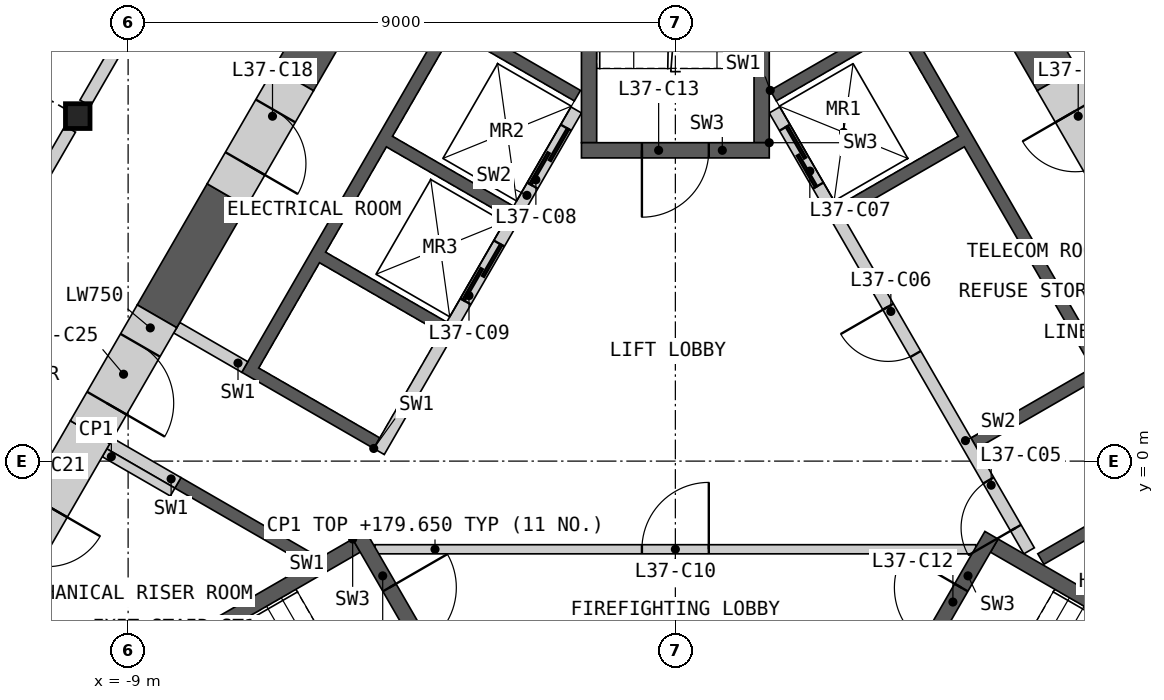
"""IFC4 building model, lengths in metres.
Left out: names, types, materials, properties, quantities, classifications, styles, units other than length and angle.
Written with IfcOpenShell. Run it as: python <this file> out.ifc"""

import sys

from ifc_helpers import new_model, si_unit, direction, frame, frame_2d, origin, origin_2d, place, context, subcontext, project, spatial, polyline, rectangle, i_section, outline, extrude, element, fill, save


model = new_model("IFC4")
c1 = context("Model", 3, precision=1e-05, world=origin(), true_north=direction((0.0, 1.0)))
c2 = subcontext(c1, "Body", "Model", "MODEL_VIEW")
j1 = project(units=[si_unit("LENGTHUNIT", "METRE"), si_unit("PLANEANGLEUNIT", "RADIAN")], contexts=[c1])
p1 = place(None, origin())
s1 = spatial("IfcSite", under=j1, at=p1, CompositionType="ELEMENT")
p2 = place(p1, origin())
s2 = spatial("IfcBuilding", under=s1, at=p2, CompositionType="ELEMENT")
p3 = place(p2, frame((0.0, 0.0, 176.4)))
s3 = spatial("IfcBuildingStorey", under=s2, at=p3, CompositionType="ELEMENT", Elevation=176.4)
p4 = place(p3, frame((-9.828, 5.675, 0.0), z_axis=(0.0, 0.0, 1.0), x_axis=(1.0, 0.0, 0.0)))
e1 = element("IfcColumn", 1, at=p4, inside=s3, PredefinedType="COLUMN", context=c2, shape_type="SweptSolid", body=[
    extrude(i_section(OverallWidth=0.404, OverallDepth=0.407, WebThickness=0.027, FlangeThickness=0.044, at=origin_2d()), origin(), (0.0, 0.0, 1.0), 3.6),
])
p5 = place(p3, origin())
e2 = element("IfcWall", 2, at=p5, inside=s3, PredefinedType="SHEAR", context=c2, shape_type="SweptSolid", body=[
    extrude(outline(polyline([(1.561, 6.097), (3.731, 7.35), (7.131, 1.461), (4.96, 0.208), (4.861, 0.381), (6.852, 1.531), (4.752, 5.169), (2.76, 4.019), (2.66, 4.192), (4.652, 5.342), (3.652, 7.074), (1.66, 5.924), (1.561, 6.097)])), origin(), (0.0, 0.0, 1.0), 3.25),
])
p6 = place(p3, origin())
e3 = element("IfcWall", 3, at=p6, inside=s3, PredefinedType="SHEAR", context=c2, shape_type="SweptSolid", body=[
    extrude(outline(polyline([(8.231, -0.444), (6.061, -1.697), (5.96, -1.524), (8.131, -0.271), (8.231, -0.444)])), origin(), (0.0, 0.0, 1.0), 3.25),
])
p7 = place(p3, frame((5.817, -1.476, 0.0), z_axis=(0.0, 0.0, 1.0), x_axis=(-0.500002616675, 0.866023893041, 0.0)))
e4 = element("IfcWall", 4, at=p7, inside=s3, PredefinedType="SOLIDWALL", context=c2, shape_type="SweptSolid", body=[
    extrude(rectangle(XDim=8.373, YDim=0.2, at=frame_2d((4.187, 0.0))), origin(), (0.0, 0.0, 1.0), 3.25),
])
p8 = place(p7, frame((0.437, 0.0, 0.0)))
e5 = element("IfcOpeningElement", 5, at=p8, cuts=e4, PredefinedType="OPENING", context=c2, shape_type="SweptSolid", body=[
    extrude(rectangle(XDim=0.9, YDim=2.1, at=frame_2d((0.45, 1.05))), frame((0.0, 0.11, 0.0), z_axis=(0.0, -1.0, 0.0), x_axis=(1.0, 0.0, 0.0)), (0.0, 0.0, 1.0), 0.22),
])
p9 = place(p7, frame((3.737, 0.0, 0.0)))
e6 = element("IfcOpeningElement", 6, at=p9, cuts=e4, PredefinedType="OPENING", context=c2, shape_type="SweptSolid", body=[
    extrude(rectangle(XDim=0.9, YDim=2.1, at=frame_2d((0.45, 1.05))), frame((0.0, 0.11, 0.0), z_axis=(0.0, -1.0, 0.0), x_axis=(1.0, 0.0, 0.0)), (0.0, 0.0, 1.0), 0.22),
])
p10 = place(p7, frame((6.937, 0.0, 0.0)))
e7 = element("IfcOpeningElement", 7, at=p10, cuts=e4, PredefinedType="OPENING", context=c2, shape_type="SweptSolid", body=[
    extrude(rectangle(XDim=1.1, YDim=2.1, at=frame_2d((0.55, 1.05))), frame((0.0, 0.11, 0.0), z_axis=(0.0, -1.0, 0.0), x_axis=(1.0, 0.0, 0.0)), (0.0, 0.0, 1.0), 0.22),
])
p11 = place(p3, origin())
e8 = element("IfcWall", 8, at=p11, inside=s3, PredefinedType="SHEAR", context=c2, shape_type="SweptSolid", body=[
    extrude(outline(polyline([(-6.061, -1.697), (-8.231, -0.444), (-8.131, -0.271), (-5.96, -1.524), (-6.061, -1.697)])), origin(), (0.0, 0.0, 1.0), 3.25),
])
p12 = place(p3, origin())
e9 = element("IfcWall", 9, at=p12, inside=s3, PredefinedType="SHEAR", context=c2, shape_type="SweptSolid", body=[
    extrude(outline(polyline([(-4.96, 0.208), (-7.131, 1.461), (-3.731, 7.35), (-1.561, 6.097), (-1.66, 5.924), (-3.652, 7.074), (-4.652, 5.342), (-2.66, 4.192), (-2.76, 4.019), (-4.752, 5.169), (-5.752, 3.437), (-3.76, 2.287), (-3.861, 2.113), (-5.852, 3.263), (-6.852, 1.531), (-4.861, 0.381), (-4.96, 0.208)])), origin(), (0.0, 0.0, 1.0), 3.25),
])
p13 = place(p3, frame((-1.631, 5.776, 0.0), z_axis=(0.0, 0.0, 1.0), x_axis=(-0.499992876559, -0.866029516466, 0.0)))
e10 = element("IfcWall", 10, at=p13, inside=s3, PredefinedType="SOLIDWALL", context=c2, shape_type="SweptSolid", body=[
    extrude(rectangle(XDim=6.486, YDim=0.2, at=frame_2d((3.243, 0.0))), origin(), (0.0, 0.0, 1.0), 3.25),
])
p14 = place(p13, frame((0.337, 0.0, 0.0)))
e11 = element("IfcOpeningElement", 11, at=p14, cuts=e10, PredefinedType="OPENING", context=c2, shape_type="SweptSolid", body=[
    extrude(rectangle(XDim=1.1, YDim=2.1, at=frame_2d((0.55, 1.05))), frame((0.0, 0.11, 0.0), z_axis=(0.0, -1.0, 0.0), x_axis=(1.0, 0.0, 0.0)), (0.0, 0.0, 1.0), 0.22),
])
p15 = place(p13, frame((2.537, 0.0, 0.0)))
e12 = element("IfcOpeningElement", 12, at=p15, cuts=e10, PredefinedType="OPENING", context=c2, shape_type="SweptSolid", body=[
    extrude(rectangle(XDim=1.1, YDim=2.1, at=frame_2d((0.55, 1.05))), frame((0.0, 0.11, 0.0), z_axis=(0.0, -1.0, 0.0), x_axis=(1.0, 0.0, 0.0)), (0.0, 0.0, 1.0), 0.22),
])
for number, where, z_axis, x_axis in (
    (13, (-7.081, 1.548, 0.0), (0.0, 0.0, 1.0), (-0.866, 0.5, 0.0)),
    (14, (-8.181, -0.357, 0.0), (0.0, 0.0, 1.0), (-0.866, 0.5, 0.0)),
):
    element("IfcWall", number, at=place(p3, frame(where, z_axis=z_axis, x_axis=x_axis)), inside=s3, PredefinedType="SHEAR", context=c2, shape_type="SweptSolid", body=[
        extrude(rectangle(XDim=1.293, YDim=0.2, at=frame_2d((0.646, 0.0))), origin(), (0.0, 0.0, 1.0), 3.25),
    ])
p16 = place(p3, frame((-4.941, -1.45, 0.0), z_axis=(0.0, 0.0, 1.0), x_axis=(1.0, 0.0, 0.0)))
e15 = element("IfcWall", 15, at=p16, inside=s3, PredefinedType="PARTITIONING", context=c2, shape_type="SweptSolid", body=[
    extrude(rectangle(XDim=9.882, YDim=0.15, at=frame_2d((4.941, 0.0))), origin(), (0.0, 0.0, 1.0), 3.25),
])
p17 = place(p16, frame((4.391, 0.0, 0.0)))
e16 = element("IfcOpeningElement", 16, at=p17, cuts=e15, PredefinedType="OPENING", context=c2, shape_type="SweptSolid", body=[
    extrude(rectangle(XDim=1.1, YDim=2.1, at=frame_2d((0.55, 1.05))), frame((0.0, 0.085, 0.0), z_axis=(0.0, -1.0, 0.0), x_axis=(1.0, 0.0, 0.0)), (0.0, 0.0, 1.0), 0.17),
])
p18 = place(p3, origin())
e17 = element("IfcWall", 17, at=p18, inside=s3, PredefinedType="SHEAR", context=c2, shape_type="SweptSolid", body=[
    extrude(outline(polyline([(-5.307, -1.281), (-10.374, -4.206), (-10.032, -4.298), (-5.182, -1.498), (-5.307, -1.281)])), origin(), (0.0, 0.0, 1.0), 3.25),
])
p19 = place(p3, frame((-5.199, -1.219, 0.0), z_axis=(0.0, 0.0, 1.0), x_axis=(0.499982516597, -0.866035497597, 0.0)))
e18 = element("IfcWall", 18, at=p19, inside=s3, PredefinedType="SHEAR", context=c2, shape_type="SweptSolid", body=[
    extrude(rectangle(XDim=3.088, YDim=0.25, at=frame_2d((1.544, 0.0))), origin(), (0.0, 0.0, 1.0), 3.25),
])
p20 = place(p19, frame((0.994, 0.0, 0.0)))
e19 = element("IfcOpeningElement", 19, at=p20, cuts=e18, PredefinedType="OPENING", context=c2, shape_type="SweptSolid", body=[
    extrude(rectangle(XDim=1.1, YDim=2.1, at=frame_2d((0.55, 1.05))), frame((0.0, 0.135, 0.0), z_axis=(0.0, -1.0, 0.0), x_axis=(1.0, 0.0, 0.0)), (0.0, 0.0, 1.0), 0.27),
])
p21 = place(p3, origin())
e20 = element("IfcWall", 20, at=p21, inside=s3, PredefinedType="SHEAR", context=c2, shape_type="SweptSolid", body=[
    extrude(outline(polyline([(10.032, -4.298), (10.374, -4.206), (5.307, -1.281), (5.182, -1.498), (10.032, -4.298)])), origin(), (0.0, 0.0, 1.0), 3.25),
])
p22 = place(p3, frame((3.655, -3.893, 0.0), z_axis=(0.0, 0.0, 1.0), x_axis=(0.499982516597, 0.866035497597, 0.0)))
e21 = element("IfcWall", 21, at=p22, inside=s3, PredefinedType="SHEAR", context=c2, shape_type="SweptSolid", body=[
    extrude(rectangle(XDim=3.088, YDim=0.25, at=frame_2d((1.544, 0.0))), origin(), (0.0, 0.0, 1.0), 3.25),
])
p23 = place(p22, frame((0.994, 0.0, 0.0)))
e22 = element("IfcOpeningElement", 22, at=p23, cuts=e21, PredefinedType="OPENING", context=c2, shape_type="SweptSolid", body=[
    extrude(rectangle(XDim=1.1, YDim=2.1, at=frame_2d((0.55, 1.05))), frame((0.0, 0.135, 0.0), z_axis=(0.0, -1.0, 0.0), x_axis=(1.0, 0.0, 0.0)), (0.0, 0.0, 1.0), 0.27),
])
p24 = place(p3, origin())
e23 = element("IfcWall", 23, at=p24, inside=s3, PredefinedType="SHEAR", context=c2, shape_type="SweptSolid", body=[
    extrude(outline(polyline([(1.544, 5.237), (1.544, 11.087), (1.294, 10.837), (1.294, 5.237), (1.544, 5.237)])), origin(), (0.0, 0.0, 1.0), 3.25),
])
p25 = place(p3, origin())
e24 = element("IfcWall", 24, at=p25, inside=s3, PredefinedType="SHEAR", context=c2, shape_type="SweptSolid", body=[
    extrude(outline(polyline([(-1.294, 10.837), (-1.544, 11.087), (-1.544, 5.237), (-1.294, 5.237), (-1.294, 10.837)])), origin(), (0.0, 0.0, 1.0), 3.25),
])
p26 = place(p3, frame((1.544, 5.112, 0.0), z_axis=(0.0, 0.0, 1.0), x_axis=(-1.0, 0.0, 0.0)))
e25 = element("IfcWall", 25, at=p26, inside=s3, PredefinedType="SHEAR", context=c2, shape_type="SweptSolid", body=[
    extrude(rectangle(XDim=3.088, YDim=0.25, at=frame_2d((1.544, 0.0))), origin(), (0.0, 0.0, 1.0), 3.25),
])
p27 = place(p26, frame((0.994, 0.0, 0.0)))
e26 = element("IfcOpeningElement", 26, at=p27, cuts=e25, PredefinedType="OPENING", context=c2, shape_type="SweptSolid", body=[
    extrude(rectangle(XDim=1.1, YDim=2.1, at=frame_2d((0.55, 1.05))), frame((0.0, 0.135, 0.0), z_axis=(0.0, -1.0, 0.0), x_axis=(1.0, 0.0, 0.0)), (0.0, 0.0, 1.0), 0.27),
])
p28 = place(p3, frame((-8.268, -0.509, 0.0), z_axis=(0.0, 0.0, 1.0), x_axis=(-0.866003189247, 0.500038474733, 0.0)))
e27 = element("IfcWall", 27, at=p28, inside=s3, PredefinedType="PARTITIONING", context=c2, shape_type="SweptSolid", body=[
    extrude(rectangle(XDim=1.293, YDim=0.15, at=frame_2d((0.646, 0.0))), origin(), (0.0, 0.0, 1.0), 3.25),
])
for number, where, z_axis, x_axis in (
    (28, (6.275, 6.279, 0.0), (0.0, 0.0, 1.0), (-0.5, 0.866, 0.0)),
    (29, (-4.817, 8.804, 0.0), (0.0, 0.0, 1.0), (-0.5, -0.866, 0.0)),
):
    element("IfcWall", number, at=place(p3, frame(where, z_axis=z_axis, x_axis=x_axis)), inside=s3, PredefinedType="SHEAR", context=c2, shape_type="SweptSolid", body=[
        extrude(rectangle(XDim=2.916, YDim=0.75, at=frame_2d((1.458, 0.0))), origin(), (0.0, 0.0, 1.0), 3.25),
    ])
p29 = place(p3, frame((-7.375, 4.374, 0.0), z_axis=(0.0, 0.0, 1.0), x_axis=(-0.499952165731, -0.866053019151, 0.0)))
e30 = element("IfcWall", 30, at=p29, inside=s3, PredefinedType="SHEAR", context=c2, shape_type="SweptSolid", body=[
    extrude(rectangle(XDim=2.3, YDim=0.75, at=frame_2d((1.15, 0.0))), origin(), (0.0, 0.0, 1.0), 3.25),
])
p30 = place(p3, frame((-6.275, 6.279, 0.0), z_axis=(0.0, 0.0, 1.0), x_axis=(-0.499946605688, -0.86605622881, 0.0)))
e31 = element("IfcWall", 31, at=p30, inside=s3, PredefinedType="SHEAR", context=c2, shape_type="SweptSolid", body=[
    extrude(rectangle(XDim=2.2, YDim=0.75, at=frame_2d((1.1, 0.0))), origin(), (0.0, 0.0, 1.0), 3.25),
])
p31 = place(p30, frame((0.6, 0.0, 0.0)))
e32 = element("IfcOpeningElement", 32, at=p31, cuts=e31, PredefinedType="OPENING", context=c2, shape_type="SweptSolid", body=[
    extrude(rectangle(XDim=1.0, YDim=2.1, at=frame_2d((0.5, 1.05))), frame((0.0, 0.385, 0.0), z_axis=(0.0, -1.0, 0.0), x_axis=(1.0, 0.0, 0.0)), (0.0, 0.0, 1.0), 0.77),
])
p32 = place(p3, frame((7.375, 4.374, 0.0), z_axis=(0.0, 0.0, 1.0), x_axis=(-0.499946605688, 0.86605622881, 0.0)))
e33 = element("IfcWall", 33, at=p32, inside=s3, PredefinedType="SHEAR", context=c2, shape_type="SweptSolid", body=[
    extrude(rectangle(XDim=2.2, YDim=0.75, at=frame_2d((1.1, 0.0))), origin(), (0.0, 0.0, 1.0), 3.25),
])
p33 = place(p32, frame((0.6, 0.0, 0.0)))
e34 = element("IfcOpeningElement", 34, at=p33, cuts=e33, PredefinedType="OPENING", context=c2, shape_type="SweptSolid", body=[
    extrude(rectangle(XDim=1.0, YDim=2.1, at=frame_2d((0.5, 1.05))), frame((0.0, 0.385, 0.0), z_axis=(0.0, -1.0, 0.0), x_axis=(1.0, 0.0, 0.0)), (0.0, 0.0, 1.0), 0.77),
])
p34 = place(p3, frame((-9.625, 0.477, 0.0), z_axis=(0.0, 0.0, 1.0), x_axis=(-0.499995718215, -0.86602787586, 0.0)))
e35 = element("IfcWall", 35, at=p34, inside=s3, PredefinedType="SHEAR", context=c2, shape_type="SweptSolid", body=[
    extrude(rectangle(XDim=3.016, YDim=0.75, at=frame_2d((1.508, 0.0))), origin(), (0.0, 0.0, 1.0), 3.25),
])
p35 = place(p34, frame((1.4, 0.0, 0.0)))
e36 = element("IfcOpeningElement", 36, at=p35, cuts=e35, PredefinedType="OPENING", context=c2, shape_type="SweptSolid", body=[
    extrude(rectangle(XDim=1.0, YDim=2.1, at=frame_2d((0.5, 1.05))), frame((0.0, 0.385, 0.0), z_axis=(0.0, -1.0, 0.0), x_axis=(1.0, 0.0, 0.0)), (0.0, 0.0, 1.0), 0.77),
])
p36 = place(p3, frame((-8.525, 2.382, 0.0), z_axis=(0.0, 0.0, 1.0), x_axis=(-0.500077893725, -0.86598042715, 0.0)))
e37 = element("IfcWall", 37, at=p36, inside=s3, PredefinedType="SHEAR", context=c2, shape_type="SweptSolid", body=[
    extrude(rectangle(XDim=2.2, YDim=0.75, at=frame_2d((1.1, 0.0))), origin(), (0.0, 0.0, 1.0), 3.25),
])
p37 = place(p36, frame((0.55, 0.0, 0.0)))
e38 = element("IfcOpeningElement", 38, at=p37, cuts=e37, PredefinedType="OPENING", context=c2, shape_type="SweptSolid", body=[
    extrude(rectangle(XDim=1.1, YDim=2.1, at=frame_2d((0.55, 1.05))), frame((0.0, 0.385, 0.0), z_axis=(0.0, -1.0, 0.0), x_axis=(1.0, 0.0, 0.0)), (0.0, 0.0, 1.0), 0.77),
])
p38 = place(p3, frame((5.038, 13.972, 0.0), z_axis=(0.0, 0.0, 1.0), x_axis=(0.50000393355, -0.866023132736, 0.0)))
e39 = element("IfcWall", 39, at=p38, inside=s3, PredefinedType="PARTITIONING", context=c2, shape_type="SweptSolid", body=[
    extrude(rectangle(XDim=9.335, YDim=0.2, at=frame_2d((4.667, 0.0))), origin(), (0.0, 0.0, 1.0), 3.25),
])
p39 = place(p38, frame((1.154, 0.0, 0.0)))
e40 = element("IfcOpeningElement", 40, at=p39, cuts=e39, PredefinedType="OPENING", context=c2, shape_type="SweptSolid", body=[
    extrude(rectangle(XDim=1.1, YDim=2.1, at=frame_2d((0.55, 1.05))), frame((0.0, 0.11, 0.0), z_axis=(0.0, -1.0, 0.0), x_axis=(1.0, 0.0, 0.0)), (0.0, 0.0, 1.0), 0.22),
])
p40 = place(p3, frame((-9.705, 5.888, 0.0), z_axis=(0.0, 0.0, 1.0), x_axis=(0.50000393355, 0.866023132736, 0.0)))
e41 = element("IfcWall", 41, at=p40, inside=s3, PredefinedType="PARTITIONING", context=c2, shape_type="SweptSolid", body=[
    extrude(rectangle(XDim=9.335, YDim=0.2, at=frame_2d((4.667, 0.0))), origin(), (0.0, 0.0, 1.0), 3.25),
])
p41 = place(p40, frame((5.172, 0.0, 0.0)))
e42 = element("IfcOpeningElement", 42, at=p41, cuts=e41, PredefinedType="OPENING", context=c2, shape_type="SweptSolid", body=[
    extrude(rectangle(XDim=1.0, YDim=2.1, at=frame_2d((0.5, 1.05))), frame((0.0, 0.11, 0.0), z_axis=(0.0, -1.0, 0.0), x_axis=(1.0, 0.0, 0.0)), (0.0, 0.0, 1.0), 0.22),
])
p42 = place(p40, frame((1.556, 0.0, 0.0)))
e43 = element("IfcOpeningElement", 43, at=p42, cuts=e41, PredefinedType="OPENING", context=c2, shape_type="SweptSolid", body=[
    extrude(rectangle(XDim=1.8, YDim=2.1, at=frame_2d((0.9, 1.05))), frame((0.0, 0.11, 0.0), z_axis=(0.0, -1.0, 0.0), x_axis=(1.0, 0.0, 0.0)), (0.0, 0.0, 1.0), 0.22),
])
p43 = place(p3, frame((-14.619, -2.624, 0.0), z_axis=(0.0, 0.0, 1.0), x_axis=(0.50000393355, 0.866023132736, 0.0)))
e44 = element("IfcWall", 44, at=p43, inside=s3, PredefinedType="PARTITIONING", context=c2, shape_type="SweptSolid", body=[
    extrude(rectangle(XDim=9.335, YDim=0.2, at=frame_2d((4.667, 0.0))), origin(), (0.0, 0.0, 1.0), 3.25),
])
p44 = place(p43, frame((3.163, 0.0, 0.0)))
e45 = element("IfcOpeningElement", 45, at=p44, cuts=e44, PredefinedType="OPENING", context=c2, shape_type="SweptSolid", body=[
    extrude(rectangle(XDim=1.0, YDim=2.1, at=frame_2d((0.5, 1.05))), frame((0.0, 0.11, 0.0), z_axis=(0.0, -1.0, 0.0), x_axis=(1.0, 0.0, 0.0)), (0.0, 0.0, 1.0), 0.22),
])
p45 = place(p8, origin())
e46 = element("IfcDoor", 46, at=p45, inside=s3, OperationType="SINGLE_SWING_LEFT", PredefinedType="DOOR", context=c2, shape_type="SweptSolid", body=[
    extrude(rectangle(XDim=0.9, YDim=2.1, at=frame_2d((0.45, 1.05))), frame((0.0, 0.025, 0.0), z_axis=(0.0, -1.0, 0.0), x_axis=(1.0, 0.0, 0.0)), (0.0, 0.0, 1.0), 0.05),
])
fill(e5, e46)
p46 = place(p9, origin())
e47 = element("IfcDoor", 47, at=p46, inside=s3, OperationType="SINGLE_SWING_RIGHT", PredefinedType="DOOR", context=c2, shape_type="SweptSolid", body=[
    extrude(rectangle(XDim=0.9, YDim=2.1, at=frame_2d((0.45, 1.05))), frame((0.0, 0.025, 0.0), z_axis=(0.0, -1.0, 0.0), x_axis=(1.0, 0.0, 0.0)), (0.0, 0.0, 1.0), 0.05),
])
fill(e6, e47)
p47 = place(p10, origin())
e48 = element("IfcDoor", 48, at=p47, inside=s3, OperationType="SLIDING_TO_LEFT", PredefinedType="DOOR", context=c2, shape_type="SweptSolid", body=[
    extrude(rectangle(XDim=1.1, YDim=2.1, at=frame_2d((0.55, 1.05))), frame((0.0, 0.025, 0.0), z_axis=(0.0, -1.0, 0.0), x_axis=(1.0, 0.0, 0.0)), (0.0, 0.0, 1.0), 0.05),
])
fill(e7, e48)
p48 = place(p14, origin())
e49 = element("IfcDoor", 49, at=p48, inside=s3, OperationType="SLIDING_TO_LEFT", PredefinedType="DOOR", context=c2, shape_type="SweptSolid", body=[
    extrude(rectangle(XDim=1.1, YDim=2.1, at=frame_2d((0.55, 1.05))), frame((0.0, 0.025, 0.0), z_axis=(0.0, -1.0, 0.0), x_axis=(1.0, 0.0, 0.0)), (0.0, 0.0, 1.0), 0.05),
])
fill(e11, e49)
p49 = place(p15, origin())
e50 = element("IfcDoor", 50, at=p49, inside=s3, OperationType="SLIDING_TO_LEFT", PredefinedType="DOOR", context=c2, shape_type="SweptSolid", body=[
    extrude(rectangle(XDim=1.1, YDim=2.1, at=frame_2d((0.55, 1.05))), frame((0.0, 0.025, 0.0), z_axis=(0.0, -1.0, 0.0), x_axis=(1.0, 0.0, 0.0)), (0.0, 0.0, 1.0), 0.05),
])
fill(e12, e50)
p50 = place(p17, origin())
e51 = element("IfcDoor", 51, at=p50, inside=s3, OperationType="SINGLE_SWING_RIGHT", PredefinedType="DOOR", context=c2, shape_type="SweptSolid", body=[
    extrude(rectangle(XDim=1.1, YDim=2.1, at=frame_2d((0.55, 1.05))), frame((0.0, 0.025, 0.0), z_axis=(0.0, -1.0, 0.0), x_axis=(1.0, 0.0, 0.0)), (0.0, 0.0, 1.0), 0.05),
])
fill(e16, e51)
p51 = place(p20, origin())
e52 = element("IfcDoor", 52, at=p51, inside=s3, OperationType="SINGLE_SWING_LEFT", PredefinedType="DOOR", context=c2, shape_type="SweptSolid", body=[
    extrude(rectangle(XDim=1.1, YDim=2.1, at=frame_2d((0.55, 1.05))), frame((0.0, 0.025, 0.0), z_axis=(0.0, -1.0, 0.0), x_axis=(1.0, 0.0, 0.0)), (0.0, 0.0, 1.0), 0.05),
])
fill(e19, e52)
p52 = place(p23, origin())
e53 = element("IfcDoor", 53, at=p52, inside=s3, OperationType="SINGLE_SWING_RIGHT", PredefinedType="DOOR", context=c2, shape_type="SweptSolid", body=[
    extrude(rectangle(XDim=1.1, YDim=2.1, at=frame_2d((0.55, 1.05))), frame((0.0, 0.025, 0.0), z_axis=(0.0, -1.0, 0.0), x_axis=(1.0, 0.0, 0.0)), (0.0, 0.0, 1.0), 0.05),
])
fill(e22, e53)
p53 = place(p27, origin())
e54 = element("IfcDoor", 54, at=p53, inside=s3, OperationType="SINGLE_SWING_RIGHT", PredefinedType="DOOR", context=c2, shape_type="SweptSolid", body=[
    extrude(rectangle(XDim=1.1, YDim=2.1, at=frame_2d((0.55, 1.05))), frame((0.0, 0.025, 0.0), z_axis=(0.0, -1.0, 0.0), x_axis=(1.0, 0.0, 0.0)), (0.0, 0.0, 1.0), 0.05),
])
fill(e26, e54)
p54 = place(p31, origin())
e55 = element("IfcDoor", 55, at=p54, inside=s3, OperationType="SINGLE_SWING_RIGHT", PredefinedType="DOOR", context=c2, shape_type="SweptSolid", body=[
    extrude(rectangle(XDim=1.0, YDim=2.1, at=frame_2d((0.5, 1.05))), frame((0.0, 0.13, 0.0), z_axis=(0.0, -1.0, 0.0), x_axis=(1.0, 0.0, 0.0)), (0.0, 0.0, 1.0), 0.05),
])
fill(e32, e55)
p55 = place(p33, origin())
e56 = element("IfcDoor", 56, at=p55, inside=s3, OperationType="SINGLE_SWING_RIGHT", PredefinedType="DOOR", context=c2, shape_type="SweptSolid", body=[
    extrude(rectangle(XDim=1.0, YDim=2.1, at=frame_2d((0.5, 1.05))), frame((0.0, 0.13, 0.0), z_axis=(0.0, -1.0, 0.0), x_axis=(1.0, 0.0, 0.0)), (0.0, 0.0, 1.0), 0.05),
])
fill(e34, e56)
p56 = place(p35, origin())
e57 = element("IfcDoor", 57, at=p56, inside=s3, OperationType="SINGLE_SWING_LEFT", PredefinedType="DOOR", context=c2, shape_type="SweptSolid", body=[
    extrude(rectangle(XDim=1.0, YDim=2.1, at=frame_2d((0.5, 1.05))), frame((0.0, 0.13, 0.0), z_axis=(0.0, -1.0, 0.0), x_axis=(1.0, 0.0, 0.0)), (0.0, 0.0, 1.0), 0.05),
])
fill(e36, e57)
p57 = place(p37, origin())
e58 = element("IfcDoor", 58, at=p57, inside=s3, OperationType="SINGLE_SWING_RIGHT", PredefinedType="DOOR", context=c2, shape_type="SweptSolid", body=[
    extrude(rectangle(XDim=1.1, YDim=2.1, at=frame_2d((0.55, 1.05))), frame((0.0, 0.13, 0.0), z_axis=(0.0, -1.0, 0.0), x_axis=(1.0, 0.0, 0.0)), (0.0, 0.0, 1.0), 0.05),
])
fill(e38, e58)
save(model, sys.argv[1])
